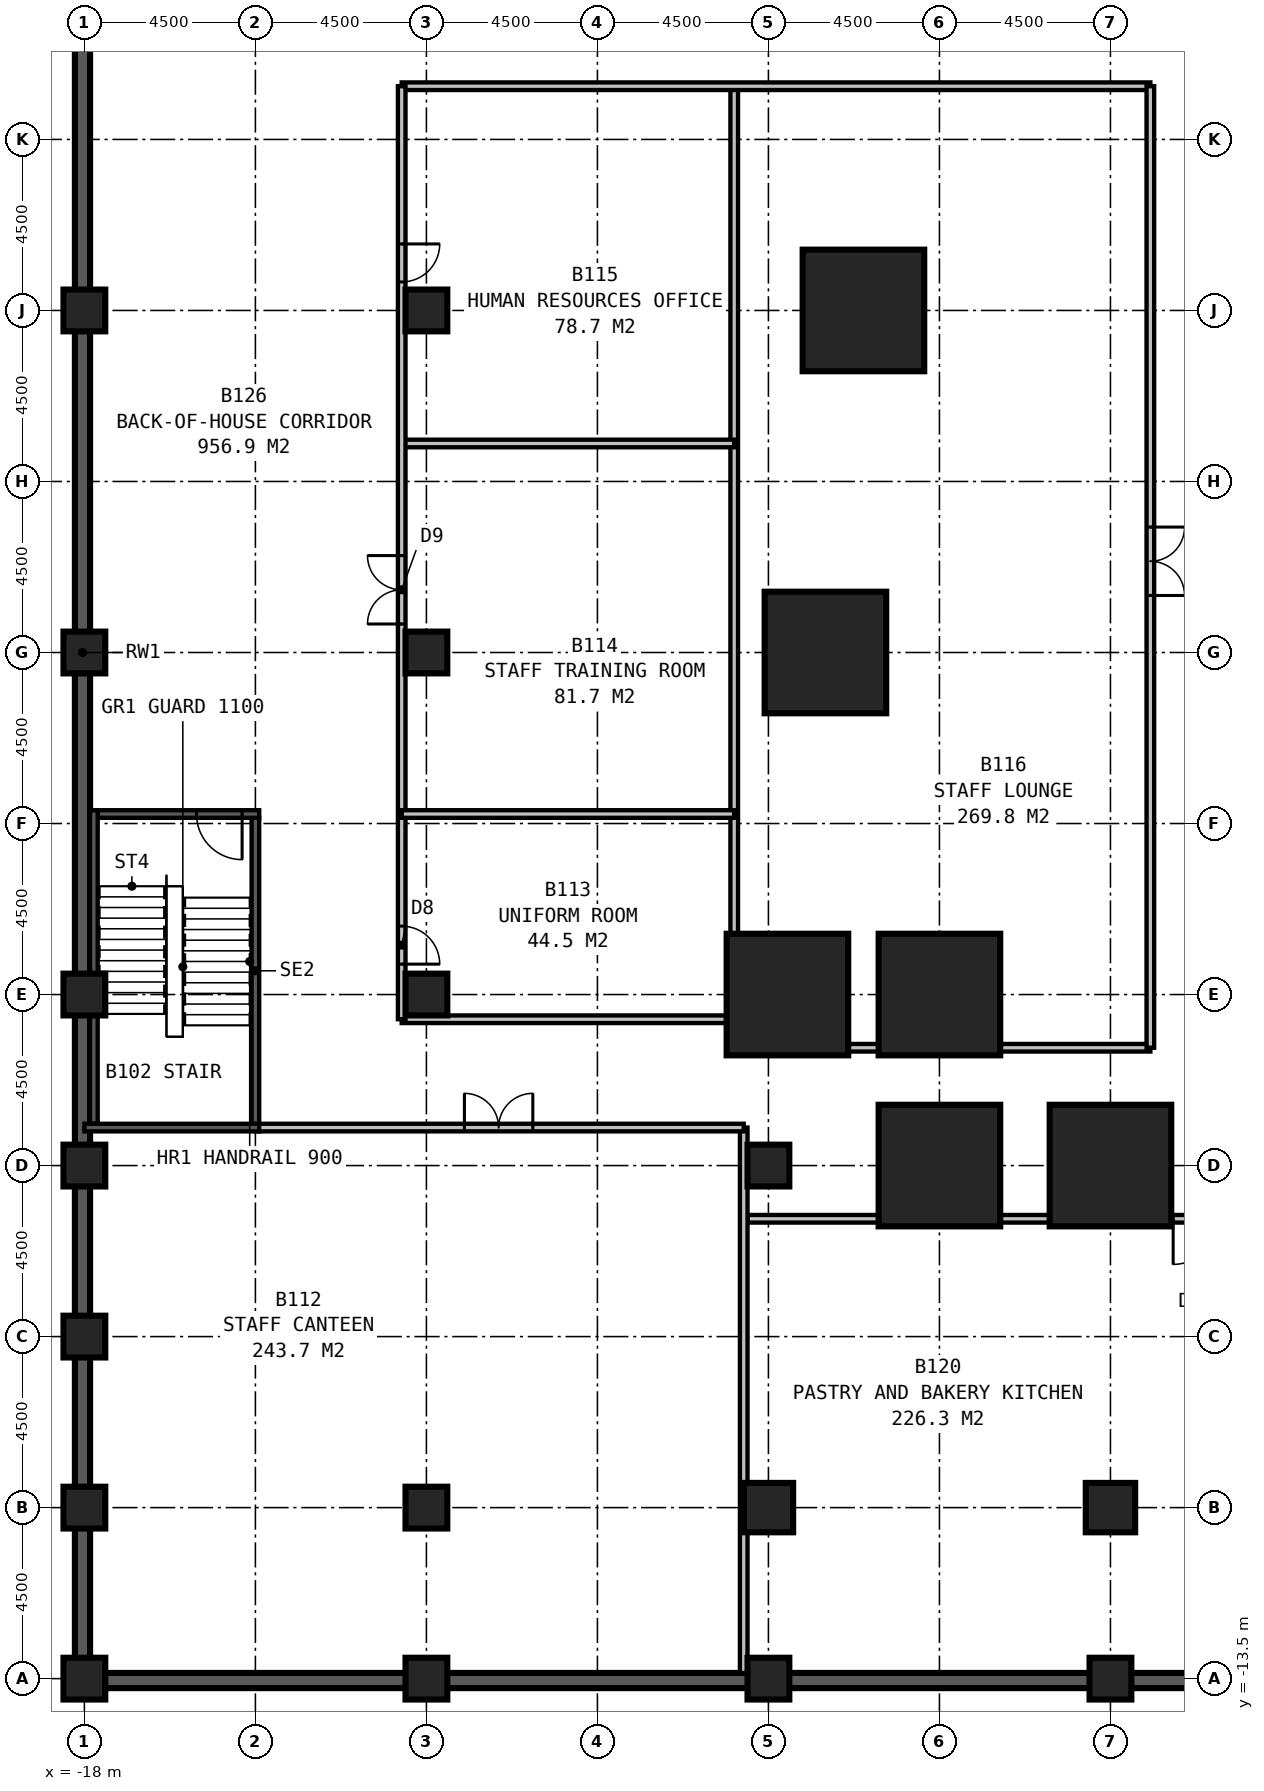
"""IFC4 building model, lengths in metres.
Left out: names, types, materials, properties, quantities, classifications, styles, units other than length and angle.
Written with IfcOpenShell. Run it as: python <this file> out.ifc"""

import sys

from ifc_helpers import new_model, si_unit, direction, frame, frame_2d, origin, origin_2d, place, context, subcontext, project, spatial, rectangle, extrude, element, fill, save


model = new_model("IFC4")
c1 = context("Model", 3, precision=1e-05, world=origin(), true_north=direction((0.0, 1.0)))
c2 = subcontext(c1, "Body", "Model", "MODEL_VIEW")
j1 = project(units=[si_unit("LENGTHUNIT", "METRE"), si_unit("PLANEANGLEUNIT", "RADIAN")], contexts=[c1])
p1 = place(None, origin())
s1 = spatial("IfcSite", under=j1, at=p1, CompositionType="ELEMENT")
p2 = place(p1, origin())
s2 = spatial("IfcBuilding", under=s1, at=p2, CompositionType="ELEMENT")
p3 = place(p2, frame((0.0, 0.0, -4.5)))
s3 = spatial("IfcBuildingStorey", under=s2, at=p3, CompositionType="ELEMENT", Elevation=-4.5)
for number, where, z_axis, x_axis in (
    (1, (0.5, 4.5, 0.0), (0.0, 0.0, 1.0), (1.0, 0.0, 0.0)),
    (2, (4.5, 4.5, 0.0), (0.0, 0.0, 1.0), (1.0, 0.0, 0.0)),
    (3, (4.5, 0.0, 0.0), (0.0, 0.0, 1.0), (1.0, 0.0, 0.0)),
    (4, (9.0, 0.0, 0.0), (0.0, 0.0, 1.0), (1.0, 0.0, 0.0)),
    (5, (2.5, 22.5, 0.0), (0.0, 0.0, 1.0), (1.0, 0.0, 0.0)),
    (6, (1.5, 13.5, 0.0), (0.0, 0.0, 1.0), (1.0, 0.0, 0.0)),
):
    element("IfcColumn", number, at=place(p3, frame(where, z_axis=z_axis, x_axis=x_axis)), inside=s3, PredefinedType="COLUMN", context=c2, shape_type="SweptSolid", body=[
        extrude(rectangle(XDim=3.2, YDim=3.2, at=origin_2d()), origin(), (0.0, 0.0, 1.0), 4.5),
    ])
for number, where, z_axis, x_axis in (
    (7, (-18.0, -13.5, 0.0), (0.0, 0.0, 1.0), (1.0, 0.0, 0.0)),
    (8, (-9.0, -13.5, 0.0), (0.0, 0.0, 1.0), (1.0, 0.0, 0.0)),
    (9, (-18.0, -4.5, 0.0), (0.0, 0.0, 1.0), (1.0, 0.0, 0.0)),
    (10, (-18.0, 4.5, 0.0), (0.0, 0.0, 1.0), (1.0, 0.0, 0.0)),
    (11, (-9.0, 4.5, 0.0), (0.0, 0.0, 1.0), (1.0, 0.0, 0.0)),
    (12, (-18.0, 13.5, 0.0), (0.0, 0.0, 1.0), (1.0, 0.0, 0.0)),
    (13, (-9.0, 13.5, 0.0), (0.0, 0.0, 1.0), (1.0, 0.0, 0.0)),
    (14, (-18.0, 22.5, 0.0), (0.0, 0.0, 1.0), (1.0, 0.0, 0.0)),
    (15, (-9.0, 22.5, 0.0), (0.0, 0.0, 1.0), (1.0, 0.0, 0.0)),
    (16, (-18.0, 0.0, 0.0), (0.0, 0.0, 1.0), (1.0, 0.0, 0.0)),
    (17, (0.0, -13.5, 0.0), (0.0, 0.0, 1.0), (1.0, 0.0, 0.0)),
    (18, (9.0, -13.5, 0.0), (0.0, 0.0, 1.0), (1.0, 0.0, 0.0)),
):
    element("IfcColumn", number, at=place(p3, frame(where, z_axis=z_axis, x_axis=x_axis)), inside=s3, PredefinedType="COLUMN", context=c2, shape_type="SweptSolid", body=[
        extrude(rectangle(XDim=1.1, YDim=1.1, at=origin_2d()), origin(), (0.0, 0.0, 1.0), 4.5),
    ])
for number, where, z_axis, x_axis in (
    (19, (0.0, -9.0, 0.0), (0.0, 0.0, 1.0), (1.0, 0.0, 0.0)),
    (20, (9.0, -9.0, 0.0), (0.0, 0.0, 1.0), (1.0, 0.0, 0.0)),
):
    element("IfcColumn", number, at=place(p3, frame(where, z_axis=z_axis, x_axis=x_axis)), inside=s3, PredefinedType="COLUMN", context=c2, shape_type="SweptSolid", body=[
        extrude(rectangle(XDim=1.3, YDim=1.3, at=origin_2d()), origin(), (0.0, 0.0, 1.0), 4.5),
    ])
for number, where, z_axis, x_axis in (
    (21, (-18.0, -9.0, 0.0), (0.0, 0.0, 1.0), (1.0, 0.0, 0.0)),
    (22, (-9.0, -9.0, 0.0), (0.0, 0.0, 1.0), (1.0, 0.0, 0.0)),
    (23, (0.0, 0.0, 0.0), (0.0, 0.0, 1.0), (1.0, 0.0, 0.0)),
):
    element("IfcColumn", number, at=place(p3, frame(where, z_axis=z_axis, x_axis=x_axis)), inside=s3, PredefinedType="COLUMN", context=c2, shape_type="SweptSolid", body=[
        extrude(rectangle(XDim=1.1, YDim=1.1, at=origin_2d()), origin(), (0.0, 0.0, 1.0), 4.5),
    ])
p4 = place(p3, frame((-18.25, -13.55, 0.0), z_axis=(0.0, 0.0, 1.0), x_axis=(1.0, 0.0, 0.0)))
e24 = element("IfcWall", 24, at=p4, inside=s3, PredefinedType="SOLIDWALL", context=c2, shape_type="SweptSolid", body=[
    extrude(rectangle(XDim=77.0, YDim=0.4, at=frame_2d((38.5, 0.0))), origin(), (0.0, 0.0, 1.0), 4.5),
])
p5 = place(p3, frame((-18.05, 40.35, 0.0), z_axis=(0.0, 0.0, 1.0), x_axis=(0.0, -1.0, 0.0)))
e25 = element("IfcWall", 25, at=p5, inside=s3, PredefinedType="SOLIDWALL", context=c2, shape_type="SweptSolid", body=[
    extrude(rectangle(XDim=53.7, YDim=0.4, at=frame_2d((26.85, 0.0))), origin(), (0.0, 0.0, 1.0), 4.5),
])
p6 = place(p3, frame((-17.65, 9.25, 0.0), z_axis=(0.0, 0.0, 1.0), x_axis=(1.0, 0.0, 0.0)))
e26 = element("IfcWall", 26, at=p6, inside=s3, PredefinedType="SOLIDWALL", context=c2, shape_type="SweptSolid", body=[
    extrude(rectangle(XDim=4.25, YDim=0.2, at=frame_2d((2.125, 0.0))), origin(), (0.0, 0.0, 1.0), 4.2),
])
p7 = place(p6, frame((3.8, 0.0, 0.0), z_axis=(0.0, 0.0, 1.0), x_axis=(-1.0, 0.0, 0.0)))
e27 = element("IfcOpeningElement", 27, at=p7, cuts=e26, PredefinedType="OPENING", context=c2, shape_type="SweptSolid", body=[
    extrude(rectangle(XDim=1.2, YDim=2.1, at=frame_2d((0.6, 1.05))), frame((0.0, 0.11, 0.0), z_axis=(0.0, -1.0, 0.0), x_axis=(1.0, 0.0, 0.0)), (0.0, 0.0, 1.0), 0.22),
])
p8 = place(p3, frame((-18.0, 1.0, 0.0), z_axis=(0.0, 0.0, 1.0), x_axis=(1.0, 0.0, 0.0)))
e28 = element("IfcWall", 28, at=p8, inside=s3, PredefinedType="SOLIDWALL", context=c2, shape_type="SweptSolid", body=[
    extrude(rectangle(XDim=4.6, YDim=0.2, at=frame_2d((2.3, 0.0))), origin(), (0.0, 0.0, 1.0), 4.2),
])
p9 = place(p3, frame((-13.5, 1.1, 0.0), z_axis=(0.0, 0.0, 1.0), x_axis=(0.0, 1.0, 0.0)))
e29 = element("IfcWall", 29, at=p9, inside=s3, PredefinedType="SOLIDWALL", context=c2, shape_type="SweptSolid", body=[
    extrude(rectangle(XDim=8.05, YDim=0.2, at=frame_2d((4.025, 0.0))), origin(), (0.0, 0.0, 1.0), 4.2),
])
p10 = place(p3, frame((-17.75, 1.1, 0.0), z_axis=(0.0, 0.0, 1.0), x_axis=(0.0, 1.0, 0.0)))
e30 = element("IfcWall", 30, at=p10, inside=s3, PredefinedType="SOLIDWALL", context=c2, shape_type="SweptSolid", body=[
    extrude(rectangle(XDim=2.85, YDim=0.2, at=frame_2d((1.425, 0.0))), origin(), (0.0, 0.0, 1.0), 4.2),
])
p11 = place(p3, frame((-17.75, 5.05, 0.0), z_axis=(0.0, 0.0, 1.0), x_axis=(0.0, 1.0, 0.0)))
e31 = element("IfcWall", 31, at=p11, inside=s3, PredefinedType="SOLIDWALL", context=c2, shape_type="SweptSolid", body=[
    extrude(rectangle(XDim=4.3, YDim=0.2, at=frame_2d((2.15, 0.0))), origin(), (0.0, 0.0, 1.0), 4.2),
])
p12 = place(p3, frame((-0.65, -13.35, 0.0), z_axis=(0.0, 0.0, 1.0), x_axis=(0.0, 1.0, 0.0)))
e32 = element("IfcWall", 32, at=p12, inside=s3, PredefinedType="PARTITIONING", context=c2, shape_type="SweptSolid", body=[
    extrude(rectangle(XDim=14.35, YDim=0.2, at=frame_2d((7.175, 0.0))), origin(), (0.0, 0.0, 1.0), 3.3),
])
p13 = place(p3, frame((-13.5, 1.0, 0.0), z_axis=(0.0, 0.0, 1.0), x_axis=(1.0, 0.0, 0.0)))
e33 = element("IfcWall", 33, at=p13, inside=s3, PredefinedType="PARTITIONING", context=c2, shape_type="SweptSolid", body=[
    extrude(rectangle(XDim=12.85, YDim=0.2, at=frame_2d((6.425, 0.0))), origin(), (0.0, 0.0, 1.0), 4.2),
])
p14 = place(p13, frame((5.5, 0.0, 0.0)))
e34 = element("IfcOpeningElement", 34, at=p14, cuts=e33, PredefinedType="OPENING", context=c2, shape_type="SweptSolid", body=[
    extrude(rectangle(XDim=1.8, YDim=2.4, at=frame_2d((0.9, 1.2))), frame((0.0, 0.11, 0.0), z_axis=(0.0, -1.0, 0.0), x_axis=(1.0, 0.0, 0.0)), (0.0, 0.0, 1.0), 0.22),
])
p15 = place(p3, frame((-9.65, 3.85, 0.0), z_axis=(0.0, 0.0, 1.0), x_axis=(0.0, 1.0, 0.0)))
e35 = element("IfcWall", 35, at=p15, inside=s3, PredefinedType="PARTITIONING", context=c2, shape_type="SweptSolid", body=[
    extrude(rectangle(XDim=24.55, YDim=0.2, at=frame_2d((12.275, 0.0))), origin(), (0.0, 0.0, 1.0), 4.2),
])
p16 = place(p15, frame((2.45, 0.0, 0.0), z_axis=(0.0, 0.0, 1.0), x_axis=(-1.0, 0.0, 0.0)))
e36 = element("IfcOpeningElement", 36, at=p16, cuts=e35, PredefinedType="OPENING", context=c2, shape_type="SweptSolid", body=[
    extrude(rectangle(XDim=1.0, YDim=2.1, at=frame_2d((0.5, 1.05))), frame((0.0, 0.11, 0.0), z_axis=(0.0, -1.0, 0.0), x_axis=(1.0, 0.0, 0.0)), (0.0, 0.0, 1.0), 0.22),
])
p17 = place(p15, frame((10.4, 0.0, 0.0)))
e37 = element("IfcOpeningElement", 37, at=p17, cuts=e35, PredefinedType="OPENING", context=c2, shape_type="SweptSolid", body=[
    extrude(rectangle(XDim=1.8, YDim=2.4, at=frame_2d((0.9, 1.2))), frame((0.0, 0.11, 0.0), z_axis=(0.0, -1.0, 0.0), x_axis=(1.0, 0.0, 0.0)), (0.0, 0.0, 1.0), 0.22),
])
p18 = place(p15, frame((20.4, 0.0, 0.0), z_axis=(0.0, 0.0, 1.0), x_axis=(-1.0, 0.0, 0.0)))
e38 = element("IfcOpeningElement", 38, at=p18, cuts=e35, PredefinedType="OPENING", context=c2, shape_type="SweptSolid", body=[
    extrude(rectangle(XDim=1.0, YDim=2.1, at=frame_2d((0.5, 1.05))), frame((0.0, 0.11, 0.0), z_axis=(0.0, -1.0, 0.0), x_axis=(1.0, 0.0, 0.0)), (0.0, 0.0, 1.0), 0.22),
])
for number, where, z_axis, x_axis in (
    (39, (-9.65, 3.85, 0.0), (0.0, 0.0, 1.0), (1.0, 0.0, 0.0)),
    (40, (-9.65, 9.25, 0.0), (0.0, 0.0, 1.0), (1.0, 0.0, 0.0)),
    (41, (-9.65, 19.0, 0.0), (0.0, 0.0, 1.0), (1.0, 0.0, 0.0)),
):
    element("IfcWall", number, at=place(p3, frame(where, z_axis=z_axis, x_axis=x_axis)), inside=s3, PredefinedType="PARTITIONING", context=c2, shape_type="SweptSolid", body=[
        extrude(rectangle(XDim=8.75, YDim=0.2, at=frame_2d((4.375, 0.0))), origin(), (0.0, 0.0, 1.0), 4.2),
    ])
p19 = place(p3, frame((-0.9, 3.1, 0.0), z_axis=(0.0, 0.0, 1.0), x_axis=(0.0, 1.0, 0.0)))
e42 = element("IfcWall", 42, at=p19, inside=s3, PredefinedType="PARTITIONING", context=c2, shape_type="SweptSolid", body=[
    extrude(rectangle(XDim=25.3, YDim=0.2, at=frame_2d((12.65, 0.0))), origin(), (0.0, 0.0, 1.0), 4.2),
])
p20 = place(p3, frame((-9.65, 28.4, 0.0), z_axis=(0.0, 0.0, 1.0), x_axis=(1.0, 0.0, 0.0)))
e43 = element("IfcWall", 43, at=p20, inside=s3, PredefinedType="PARTITIONING", context=c2, shape_type="SweptSolid", body=[
    extrude(rectangle(XDim=19.7, YDim=0.2, at=frame_2d((9.85, 0.0))), origin(), (0.0, 0.0, 1.0), 4.2),
])
p21 = place(p3, frame((-0.9, 3.1, 0.0), z_axis=(0.0, 0.0, 1.0), x_axis=(1.0, 0.0, 0.0)))
e44 = element("IfcWall", 44, at=p21, inside=s3, PredefinedType="PARTITIONING", context=c2, shape_type="SweptSolid", body=[
    extrude(rectangle(XDim=10.95, YDim=0.2, at=frame_2d((5.475, 0.0))), origin(), (0.0, 0.0, 1.0), 4.2),
])
p22 = place(p3, frame((10.05, 3.1, 0.0), z_axis=(0.0, 0.0, 1.0), x_axis=(0.0, 1.0, 0.0)))
e45 = element("IfcWall", 45, at=p22, inside=s3, PredefinedType="PARTITIONING", context=c2, shape_type="SweptSolid", body=[
    extrude(rectangle(XDim=25.3, YDim=0.2, at=frame_2d((12.65, 0.0))), origin(), (0.0, 0.0, 1.0), 4.2),
])
p23 = place(p22, frame((13.7, 0.0, 0.0), z_axis=(0.0, 0.0, 1.0), x_axis=(-1.0, 0.0, 0.0)))
e46 = element("IfcOpeningElement", 46, at=p23, cuts=e45, PredefinedType="OPENING", context=c2, shape_type="SweptSolid", body=[
    extrude(rectangle(XDim=1.8, YDim=2.4, at=frame_2d((0.9, 1.2))), frame((0.0, 0.11, 0.0), z_axis=(0.0, -1.0, 0.0), x_axis=(1.0, 0.0, 0.0)), (0.0, 0.0, 1.0), 0.22),
])
p24 = place(p3, frame((-0.55, -1.4, 0.0), z_axis=(0.0, 0.0, 1.0), x_axis=(1.0, 0.0, 0.0)))
e47 = element("IfcWall", 47, at=p24, inside=s3, PredefinedType="PARTITIONING", context=c2, shape_type="SweptSolid", body=[
    extrude(rectangle(XDim=50.7, YDim=0.2, at=frame_2d((25.35, 0.0))), origin(), (0.0, 0.0, 1.0), 3.3),
])
p25 = place(p24, frame((12.4, 0.0, 0.0), z_axis=(0.0, 0.0, 1.0), x_axis=(-1.0, 0.0, 0.0)))
e48 = element("IfcOpeningElement", 48, at=p25, cuts=e47, PredefinedType="OPENING", context=c2, shape_type="SweptSolid", body=[
    extrude(rectangle(XDim=1.2, YDim=2.1, at=frame_2d((0.6, 1.05))), frame((0.0, 0.11, 0.0), z_axis=(0.0, -1.0, 0.0), x_axis=(1.0, 0.0, 0.0)), (0.0, 0.0, 1.0), 0.22),
])
p26 = place(p24, frame((21.4, 0.0, 0.0), z_axis=(0.0, 0.0, 1.0), x_axis=(-1.0, 0.0, 0.0)))
e49 = element("IfcOpeningElement", 49, at=p26, cuts=e47, PredefinedType="OPENING", context=c2, shape_type="SweptSolid", body=[
    extrude(rectangle(XDim=1.2, YDim=2.1, at=frame_2d((0.6, 1.05))), frame((0.0, 0.11, 0.0), z_axis=(0.0, -1.0, 0.0), x_axis=(1.0, 0.0, 0.0)), (0.0, 0.0, 1.0), 0.22),
])
p27 = place(p24, frame((34.9, 0.0, 0.0), z_axis=(0.0, 0.0, 1.0), x_axis=(-1.0, 0.0, 0.0)))
e50 = element("IfcOpeningElement", 50, at=p27, cuts=e47, PredefinedType="OPENING", context=c2, shape_type="SweptSolid", body=[
    extrude(rectangle(XDim=1.2, YDim=2.1, at=frame_2d((0.6, 1.05))), frame((0.0, 0.11, 0.0), z_axis=(0.0, -1.0, 0.0), x_axis=(1.0, 0.0, 0.0)), (0.0, 0.0, 1.0), 0.22),
])
p28 = place(p24, frame((39.4, 0.0, 0.0), z_axis=(0.0, 0.0, 1.0), x_axis=(-1.0, 0.0, 0.0)))
e51 = element("IfcOpeningElement", 51, at=p28, cuts=e47, PredefinedType="OPENING", context=c2, shape_type="SweptSolid", body=[
    extrude(rectangle(XDim=1.2, YDim=2.1, at=frame_2d((0.6, 1.05))), frame((0.0, 0.11, 0.0), z_axis=(0.0, -1.0, 0.0), x_axis=(1.0, 0.0, 0.0)), (0.0, 0.0, 1.0), 0.22),
])
p29 = place(p24, frame((48.85, 0.0, 0.0), z_axis=(0.0, 0.0, 1.0), x_axis=(-1.0, 0.0, 0.0)))
e52 = element("IfcOpeningElement", 52, at=p29, cuts=e47, PredefinedType="OPENING", context=c2, shape_type="SweptSolid", body=[
    extrude(rectangle(XDim=1.2, YDim=2.1, at=frame_2d((0.6, 1.05))), frame((0.0, 0.11, 0.0), z_axis=(0.0, -1.0, 0.0), x_axis=(1.0, 0.0, 0.0)), (0.0, 0.0, 1.0), 0.22),
])
p30 = place(p7, origin())
e53 = element("IfcDoor", 53, at=p30, inside=s3, OperationType="SINGLE_SWING_LEFT", PredefinedType="DOOR", context=c2, shape_type="SweptSolid", body=[
    extrude(rectangle(XDim=1.2, YDim=2.1, at=frame_2d((0.6, 1.05))), frame((0.0, 0.025, 0.0), z_axis=(0.0, -1.0, 0.0), x_axis=(1.0, 0.0, 0.0)), (0.0, 0.0, 1.0), 0.05),
])
fill(e27, e53)
p31 = place(p14, origin())
e54 = element("IfcDoor", 54, at=p31, inside=s3, OperationType="DOUBLE_DOOR_SINGLE_SWING", PredefinedType="DOOR", context=c2, shape_type="SweptSolid", body=[
    extrude(rectangle(XDim=1.8, YDim=2.4, at=frame_2d((0.9, 1.2))), frame((0.0, 0.025, 0.0), z_axis=(0.0, -1.0, 0.0), x_axis=(1.0, 0.0, 0.0)), (0.0, 0.0, 1.0), 0.05),
])
fill(e34, e54)
p32 = place(p16, origin())
e55 = element("IfcDoor", 55, at=p32, inside=s3, OperationType="SINGLE_SWING_RIGHT", PredefinedType="DOOR", context=c2, shape_type="SweptSolid", body=[
    extrude(rectangle(XDim=1.0, YDim=2.1, at=frame_2d((0.5, 1.05))), frame((0.0, 0.025, 0.0), z_axis=(0.0, -1.0, 0.0), x_axis=(1.0, 0.0, 0.0)), (0.0, 0.0, 1.0), 0.05),
])
fill(e36, e55)
p33 = place(p17, origin())
e56 = element("IfcDoor", 56, at=p33, inside=s3, OperationType="DOUBLE_DOOR_SINGLE_SWING", PredefinedType="DOOR", context=c2, shape_type="SweptSolid", body=[
    extrude(rectangle(XDim=1.8, YDim=2.4, at=frame_2d((0.9, 1.2))), frame((0.0, 0.025, 0.0), z_axis=(0.0, -1.0, 0.0), x_axis=(1.0, 0.0, 0.0)), (0.0, 0.0, 1.0), 0.05),
])
fill(e37, e56)
p34 = place(p18, origin())
e57 = element("IfcDoor", 57, at=p34, inside=s3, OperationType="SINGLE_SWING_LEFT", PredefinedType="DOOR", context=c2, shape_type="SweptSolid", body=[
    extrude(rectangle(XDim=1.0, YDim=2.1, at=frame_2d((0.5, 1.05))), frame((0.0, 0.025, 0.0), z_axis=(0.0, -1.0, 0.0), x_axis=(1.0, 0.0, 0.0)), (0.0, 0.0, 1.0), 0.05),
])
fill(e38, e57)
p35 = place(p23, origin())
e58 = element("IfcDoor", 58, at=p35, inside=s3, OperationType="DOUBLE_DOOR_SINGLE_SWING", PredefinedType="DOOR", context=c2, shape_type="SweptSolid", body=[
    extrude(rectangle(XDim=1.8, YDim=2.4, at=frame_2d((0.9, 1.2))), frame((0.0, 0.025, 0.0), z_axis=(0.0, -1.0, 0.0), x_axis=(1.0, 0.0, 0.0)), (0.0, 0.0, 1.0), 0.05),
])
fill(e46, e58)
p36 = place(p25, origin())
e59 = element("IfcDoor", 59, at=p36, inside=s3, OperationType="SINGLE_SWING_RIGHT", PredefinedType="DOOR", context=c2, shape_type="SweptSolid", body=[
    extrude(rectangle(XDim=1.2, YDim=2.1, at=frame_2d((0.6, 1.05))), frame((0.0, 0.025, 0.0), z_axis=(0.0, -1.0, 0.0), x_axis=(1.0, 0.0, 0.0)), (0.0, 0.0, 1.0), 0.05),
])
fill(e48, e59)
save(model, sys.argv[1])
